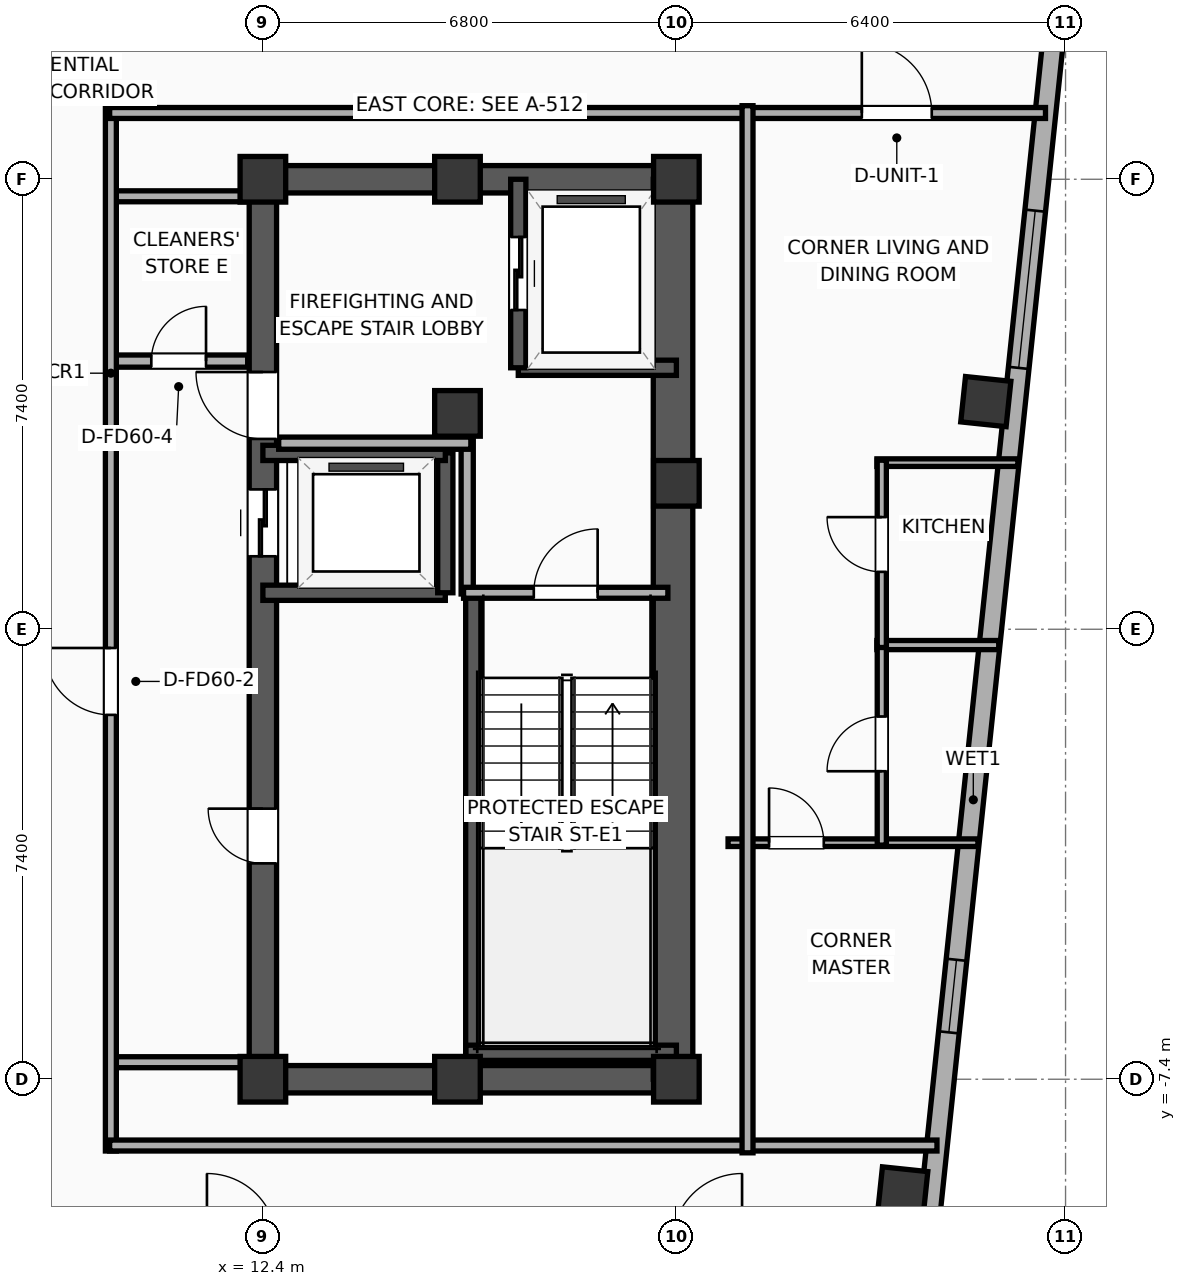
"""IFC4 building model, lengths in metres.
Left out: names, types, materials, properties, quantities, classifications, styles, units other than length and angle.
Written with IfcOpenShell. Run it as: python <this file> out.ifc"""

import sys

from ifc_helpers import new_model, si_unit, direction, frame, frame_2d, origin, origin_2d, place, context, subcontext, project, spatial, rectangle, hollow_rectangle, extrude, element, fill, save


model = new_model("IFC4")
c1 = context("Model", 3, precision=1e-05, world=origin(), true_north=direction((0.0, 1.0)))
c2 = subcontext(c1, "Body", "Model", "MODEL_VIEW")
j1 = project(units=[si_unit("LENGTHUNIT", "METRE"), si_unit("PLANEANGLEUNIT", "RADIAN")], contexts=[c1])
p1 = place(None, origin())
s1 = spatial("IfcSite", under=j1, at=p1, CompositionType="ELEMENT")
p2 = place(p1, origin())
s2 = spatial("IfcBuilding", under=s1, at=p2, CompositionType="ELEMENT")
p3 = place(p2, frame((0.0, 0.0, 299.0)))
s3 = spatial("IfcBuildingStorey", under=s2, at=p3, CompositionType="ELEMENT", Elevation=299.0)
for number, where, z_axis, x_axis in (
    (1, (12.4, -7.4, 0.0), (0.0, 0.0, 1.0), (1.0, 0.0, 0.0)),
    (2, (15.6, 3.55, 0.0), (0.0, 0.0, 1.0), (1.0, 0.0, 0.0)),
    (3, (12.4, 7.4, 0.0), (0.0, 0.0, 1.0), (1.0, 0.0, 0.0)),
    (4, (15.6, -7.4, 0.0), (0.0, 0.0, 1.0), (1.0, 0.0, 0.0)),
    (5, (15.6, 7.4, 0.0), (0.0, 0.0, 1.0), (1.0, 0.0, 0.0)),
    (6, (19.2, -7.4, 0.0), (0.0, 0.0, 1.0), (1.0, 0.0, 0.0)),
    (7, (19.2, 2.4, 0.0), (0.0, 0.0, 1.0), (1.0, 0.0, 0.0)),
    (8, (19.2, 7.4, 0.0), (0.0, 0.0, 1.0), (1.0, 0.0, 0.0)),
):
    element("IfcColumn", number, at=place(p3, frame(where, z_axis=z_axis, x_axis=x_axis)), inside=s3, PredefinedType="COLUMN", context=c2, shape_type="SweptSolid", body=[
        extrude(rectangle(XDim=0.75, YDim=0.75, at=origin_2d()), origin(), (0.0, 0.0, 1.0), 3.9),
    ])
for number, where, z_axis, x_axis in (
    (9, (12.175, -7.4, 0.0), (0.0, 0.0, 1.0), (1.0, 0.0, 0.0)),
    (10, (12.175, 7.4, 0.0), (0.0, 0.0, 1.0), (1.0, 0.0, 0.0)),
):
    element("IfcWall", number, at=place(p3, frame(where, z_axis=z_axis, x_axis=x_axis)), inside=s3, PredefinedType="SHEAR", context=c2, shape_type="SweptSolid", body=[
        extrude(rectangle(XDim=7.25, YDim=0.45, at=frame_2d((3.625, 0.0))), origin(), (0.0, 0.0, 1.0), 3.635),
    ])
p4 = place(p3, frame((12.4, -7.4, 0.0), z_axis=(0.0, 0.0, 1.0), x_axis=(0.0, 1.0, 0.0)))
e11 = element("IfcWall", 11, at=p4, inside=s3, PredefinedType="SHEAR", context=c2, shape_type="SweptSolid", body=[
    extrude(rectangle(XDim=14.8, YDim=0.45, at=frame_2d((7.4, 0.0))), origin(), (0.0, 0.0, 1.0), 3.635),
])
p5 = place(p4, frame((8.6, 0.0, 0.0)))
e12 = element("IfcOpeningElement", 12, at=p5, cuts=e11, PredefinedType="OPENING", context=c2, shape_type="SweptSolid", body=[
    extrude(rectangle(XDim=1.1, YDim=2.05, at=frame_2d((0.55, 1.025))), frame((0.0, 0.235, 0.0), z_axis=(0.0, -1.0, 0.0), x_axis=(1.0, 0.0, 0.0)), (0.0, 0.0, 1.0), 0.47),
])
p6 = place(p4, frame((10.53, 0.0, 0.0)))
e13 = element("IfcOpeningElement", 13, at=p6, cuts=e11, PredefinedType="OPENING", context=c2, shape_type="SweptSolid", body=[
    extrude(rectangle(XDim=1.1, YDim=2.05, at=frame_2d((0.55, 1.025))), frame((0.0, 0.235, 0.0), z_axis=(0.0, -1.0, 0.0), x_axis=(1.0, 0.0, 0.0)), (0.0, 0.0, 1.0), 0.47),
])
p7 = place(p4, frame((3.55, 0.0, 0.0)))
e14 = element("IfcOpeningElement", 14, at=p7, cuts=e11, PredefinedType="OPENING", context=c2, shape_type="SweptSolid", body=[
    extrude(rectangle(XDim=0.9, YDim=2.05, at=frame_2d((0.45, 1.025))), frame((0.0, 0.235, 0.0), z_axis=(0.0, -1.0, 0.0), x_axis=(1.0, 0.0, 0.0)), (0.0, 0.0, 1.0), 0.47),
])
p8 = place(p3, frame((19.145, -7.4, 0.0), z_axis=(0.0, 0.0, 1.0), x_axis=(0.0, 1.0, 0.0)))
e15 = element("IfcWall", 15, at=p8, inside=s3, PredefinedType="SHEAR", context=c2, shape_type="SweptSolid", body=[
    extrude(rectangle(XDim=14.8, YDim=0.65, at=frame_2d((7.4, 0.0))), origin(), (0.0, 0.0, 1.0), 3.635),
])
p9 = place(p3, frame((15.86, -7.085, 0.0), z_axis=(0.0, 0.0, 1.0), x_axis=(0.0, 1.0, 0.0)))
e16 = element("IfcWall", 16, at=p9, inside=s3, PredefinedType="SOLIDWALL", context=c2, shape_type="SweptSolid", body=[
    extrude(rectangle(XDim=7.685, YDim=0.25, at=frame_2d((3.843, 0.0))), origin(), (0.0, 0.0, 1.0), 3.635),
])
p10 = place(p3, frame((15.74, -6.965, 0.0), z_axis=(0.0, 0.0, 1.0), x_axis=(1.0, 0.0, 0.0)))
e17 = element("IfcWall", 17, at=p10, inside=s3, PredefinedType="SOLIDWALL", context=c2, shape_type="SweptSolid", body=[
    extrude(rectangle(XDim=3.46, YDim=0.25, at=frame_2d((1.73, 0.0))), origin(), (0.0, 0.0, 1.0), 3.635),
])
for number, where, z_axis, x_axis in (
    (18, (22.923, -9.252, 0.0), (0.0, 0.0, 1.0), (0.995, -0.105, 0.0)),
    (19, (24.289, 3.744, 0.0), (0.0, 0.0, 1.0), (0.995, -0.105, 0.0)),
):
    element("IfcColumn", number, at=place(p3, frame(where, z_axis=z_axis, x_axis=x_axis)), inside=s3, PredefinedType="COLUMN", context=c2, shape_type="SweptSolid", body=[
        extrude(hollow_rectangle(XDim=0.75, YDim=0.75, WallThickness=0.025, at=origin_2d()), origin(), (0.0, 0.0, 1.0), 3.9),
    ])
p11 = place(p3, frame((25.67, 12.296, 0.0), z_axis=(0.0, 0.0, 1.0), x_axis=(-0.104533282919, -0.994521388791, 0.0)))
e20 = element("IfcWall", 20, at=p11, inside=s3, PredefinedType="ELEMENTEDWALL", context=c2, shape_type="SweptSolid", body=[
    extrude(rectangle(XDim=30.366, YDim=0.34, at=frame_2d((15.183, 0.0))), origin(), (0.0, 0.0, 1.0), 3.635),
])
p12 = place(p11, frame((5.442, 0.0, 0.65)))
e21 = element("IfcOpeningElement", 21, at=p12, cuts=e20, PredefinedType="OPENING", context=c2, shape_type="SweptSolid", body=[
    extrude(rectangle(XDim=2.6, YDim=2.45, at=frame_2d((1.3, 1.225))), frame((0.0, 0.18, 0.0), z_axis=(0.0, -1.0, 0.0), x_axis=(1.0, 0.0, 0.0)), (0.0, 0.0, 1.0), 0.36),
])
p13 = place(p11, frame((27.017, 0.0, 0.75)))
e22 = element("IfcOpeningElement", 22, at=p13, cuts=e20, PredefinedType="OPENING", context=c2, shape_type="SweptSolid", body=[
    extrude(rectangle(XDim=1.2, YDim=2.05, at=frame_2d((0.6, 1.025))), frame((0.0, 0.18, 0.0), z_axis=(0.0, -1.0, 0.0), x_axis=(1.0, 0.0, 0.0)), (0.0, 0.0, 1.0), 0.36),
])
p14 = place(p11, frame((17.829, 0.0, 0.75)))
e23 = element("IfcOpeningElement", 23, at=p14, cuts=e20, PredefinedType="OPENING", context=c2, shape_type="SweptSolid", body=[
    extrude(rectangle(XDim=1.2, YDim=2.05, at=frame_2d((0.6, 1.025))), frame((0.0, 0.18, 0.0), z_axis=(0.0, -1.0, 0.0), x_axis=(1.0, 0.0, 0.0)), (0.0, 0.0, 1.0), 0.36),
])
p15 = place(p3, frame((16.6, 4.3, 0.0), z_axis=(0.0, 0.0, 1.0), x_axis=(1.0, 0.0, 0.0)))
e24 = element("IfcWall", 24, at=p15, inside=s3, PredefinedType="SOLIDWALL", context=c2, shape_type="SweptSolid", body=[
    extrude(rectangle(XDim=2.6, YDim=0.25, at=frame_2d((1.3, 0.0))), origin(), (0.0, 0.0, 1.0), 3.635),
])
p16 = place(p3, frame((16.6, 7.4, 0.0), z_axis=(0.0, 0.0, 1.0), x_axis=(0.0, -1.0, 0.0)))
e25 = element("IfcWall", 25, at=p16, inside=s3, PredefinedType="SOLIDWALL", context=c2, shape_type="SweptSolid", body=[
    extrude(rectangle(XDim=3.1, YDim=0.25, at=frame_2d((1.55, 0.0))), origin(), (0.0, 0.0, 1.0), 3.635),
])
p17 = place(p16, frame((0.95, 0.0, 0.0)))
e26 = element("IfcOpeningElement", 26, at=p17, cuts=e25, PredefinedType="OPENING", context=c2, shape_type="SweptSolid", body=[
    extrude(rectangle(XDim=1.2, YDim=2.05, at=frame_2d((0.6, 1.025))), frame((0.0, 0.135, 0.0), z_axis=(0.0, -1.0, 0.0), x_axis=(1.0, 0.0, 0.0)), (0.0, 0.0, 1.0), 0.27),
])
p18 = place(p3, frame((12.4, 0.6, 0.0), z_axis=(0.0, 0.0, 1.0), x_axis=(1.0, 0.0, 0.0)))
e27 = element("IfcWall", 27, at=p18, inside=s3, PredefinedType="SOLIDWALL", context=c2, shape_type="SweptSolid", body=[
    extrude(rectangle(XDim=3.0, YDim=0.25, at=frame_2d((1.5, 0.0))), origin(), (0.0, 0.0, 1.0), 3.635),
])
p19 = place(p3, frame((15.4, 0.6, 0.0), z_axis=(0.0, 0.0, 1.0), x_axis=(0.0, 1.0, 0.0)))
e28 = element("IfcWall", 28, at=p19, inside=s3, PredefinedType="SOLIDWALL", context=c2, shape_type="SweptSolid", body=[
    extrude(rectangle(XDim=2.3, YDim=0.25, at=frame_2d((1.15, 0.0))), origin(), (0.0, 0.0, 1.0), 3.635),
])
p20 = place(p3, frame((15.4, 2.9, 0.0), z_axis=(0.0, 0.0, 1.0), x_axis=(-1.0, 0.0, 0.0)))
e29 = element("IfcWall", 29, at=p20, inside=s3, PredefinedType="SOLIDWALL", context=c2, shape_type="SweptSolid", body=[
    extrude(rectangle(XDim=3.0, YDim=0.25, at=frame_2d((1.5, 0.0))), origin(), (0.0, 0.0, 1.0), 3.635),
])
p21 = place(p3, frame((15.76, 0.58, 0.0), z_axis=(0.0, 0.0, 1.0), x_axis=(0.0, 1.0, 0.0)))
e30 = element("IfcWall", 30, at=p21, inside=s3, PredefinedType="PARTITIONING", context=c2, shape_type="SweptSolid", body=[
    extrude(rectangle(XDim=2.52, YDim=0.2, at=frame_2d((1.26, 0.0))), origin(), (0.0, 0.0, 1.0), 3.635),
])
p22 = place(p3, frame((12.66, 3.06, 0.0), z_axis=(0.0, 0.0, 1.0), x_axis=(1.0, 0.0, 0.0)))
e31 = element("IfcWall", 31, at=p22, inside=s3, PredefinedType="PARTITIONING", context=c2, shape_type="SweptSolid", body=[
    extrude(rectangle(XDim=3.16, YDim=0.2, at=frame_2d((1.58, 0.0))), origin(), (0.0, 0.0, 1.0), 3.635),
])
p23 = place(p3, frame((15.7, 0.6, 0.0), z_axis=(0.0, 0.0, 1.0), x_axis=(1.0, 0.0, 0.0)))
e32 = element("IfcWall", 32, at=p23, inside=s3, PredefinedType="PARTITIONING", context=c2, shape_type="SweptSolid", body=[
    extrude(rectangle(XDim=3.36, YDim=0.18, at=frame_2d((1.68, 0.0))), origin(), (0.0, 0.0, 1.0), 3.635),
])
p24 = place(p23, frame((1.155, 0.0, 0.0)))
e33 = element("IfcOpeningElement", 33, at=p24, cuts=e32, PredefinedType="OPENING", context=c2, shape_type="SweptSolid", body=[
    extrude(rectangle(XDim=1.05, YDim=2.05, at=frame_2d((0.525, 1.025))), frame((0.0, 0.1, 0.0), z_axis=(0.0, -1.0, 0.0), x_axis=(1.0, 0.0, 0.0)), (0.0, 0.0, 1.0), 0.2),
])
p25 = place(p3, frame((9.88, 4.41, 0.0), z_axis=(0.0, 0.0, 1.0), x_axis=(1.0, 0.0, 0.0)))
e34 = element("IfcWall", 34, at=p25, inside=s3, PredefinedType="PARTITIONING", context=c2, shape_type="SweptSolid", body=[
    extrude(rectangle(XDim=2.27, YDim=0.2, at=frame_2d((1.135, 0.0))), origin(), (0.0, 0.0, 1.0), 3.635),
])
p26 = place(p25, frame((0.685, 0.0, 0.0)))
e35 = element("IfcOpeningElement", 35, at=p26, cuts=e34, PredefinedType="OPENING", context=c2, shape_type="SweptSolid", body=[
    extrude(rectangle(XDim=0.9, YDim=2.05, at=frame_2d((0.45, 1.025))), frame((0.0, 0.11, 0.0), z_axis=(0.0, -1.0, 0.0), x_axis=(1.0, 0.0, 0.0)), (0.0, 0.0, 1.0), 0.22),
])
for number, where, z_axis, x_axis in (
    (36, (9.88, 7.12, 0.0), (0.0, 0.0, 1.0), (1.0, 0.0, 0.0)),
    (37, (9.88, -7.12, 0.0), (0.0, 0.0, 1.0), (1.0, 0.0, 0.0)),
):
    element("IfcWall", number, at=place(p3, frame(where, z_axis=z_axis, x_axis=x_axis)), inside=s3, PredefinedType="PARTITIONING", context=c2, shape_type="SweptSolid", body=[
        extrude(rectangle(XDim=2.27, YDim=0.18, at=frame_2d((1.135, 0.0))), origin(), (0.0, 0.0, 1.0), 3.635),
    ])
p27 = place(p3, frame((9.9, -8.58, 0.0), z_axis=(0.0, 0.0, 1.0), x_axis=(0.0, 1.0, 0.0)))
e38 = element("IfcWall", 38, at=p27, inside=s3, PredefinedType="PARTITIONING", context=c2, shape_type="SweptSolid", body=[
    extrude(rectangle(XDim=17.16, YDim=0.18, at=frame_2d((8.58, 0.0))), origin(), (0.0, 0.0, 1.0), 3.635),
])
p28 = place(p27, frame((7.172, 0.0, 0.0)))
e39 = element("IfcOpeningElement", 39, at=p28, cuts=e38, PredefinedType="OPENING", context=c2, shape_type="SweptSolid", body=[
    extrude(rectangle(XDim=1.1, YDim=2.05, at=frame_2d((0.55, 1.025))), frame((0.0, 0.1, 0.0), z_axis=(0.0, -1.0, 0.0), x_axis=(1.0, 0.0, 0.0)), (0.0, 0.0, 1.0), 0.2),
])
p29 = place(p3, frame((9.88, 8.49, 0.0), z_axis=(0.0, 0.0, 1.0), x_axis=(1.0, 0.0, 0.0)))
e40 = element("IfcWall", 40, at=p29, inside=s3, PredefinedType="PARTITIONING", context=c2, shape_type="SweptSolid", body=[
    extrude(rectangle(XDim=15.39, YDim=0.18, at=frame_2d((7.695, 0.0))), origin(), (0.0, 0.0, 1.0), 3.635),
])
p30 = place(p29, frame((12.37, 0.0, 0.0)))
e41 = element("IfcOpeningElement", 41, at=p30, cuts=e40, PredefinedType="OPENING", context=c2, shape_type="SweptSolid", body=[
    extrude(rectangle(XDim=1.15, YDim=2.05, at=frame_2d((0.575, 1.025))), frame((0.0, 0.1, 0.0), z_axis=(0.0, -1.0, 0.0), x_axis=(1.0, 0.0, 0.0)), (0.0, 0.0, 1.0), 0.2),
])
p31 = place(p3, frame((9.88, -8.49, 0.0), z_axis=(0.0, 0.0, 1.0), x_axis=(1.0, 0.0, 0.0)))
e42 = element("IfcWall", 42, at=p31, inside=s3, PredefinedType="PARTITIONING", context=c2, shape_type="SweptSolid", body=[
    extrude(rectangle(XDim=13.606, YDim=0.18, at=frame_2d((6.803, 0.0))), origin(), (0.0, 0.0, 1.0), 3.635),
])
p32 = place(p3, frame((22.498, 2.74, 0.0), z_axis=(0.0, 0.0, 1.0), x_axis=(1.0, 0.0, 0.0)))
e43 = element("IfcWall", 43, at=p32, inside=s3, PredefinedType="PARTITIONING", context=c2, shape_type="SweptSolid", body=[
    extrude(rectangle(XDim=2.319, YDim=0.125, at=frame_2d((1.159, 0.0))), origin(), (0.0, 0.0, 1.0), 3.635),
])
p33 = place(p3, frame((22.498, -0.26, 0.0), z_axis=(0.0, 0.0, 1.0), x_axis=(1.0, 0.0, 0.0)))
e44 = element("IfcWall", 44, at=p33, inside=s3, PredefinedType="PLUMBINGWALL", context=c2, shape_type="SweptSolid", body=[
    extrude(rectangle(XDim=2.003, YDim=0.15, at=frame_2d((1.001, 0.0))), origin(), (0.0, 0.0, 1.0), 3.635),
])
p34 = place(p3, frame((20.05, -3.51, 0.0), z_axis=(0.0, 0.0, 1.0), x_axis=(1.0, 0.0, 0.0)))
e45 = element("IfcWall", 45, at=p34, inside=s3, PredefinedType="PARTITIONING", context=c2, shape_type="SweptSolid", body=[
    extrude(rectangle(XDim=4.11, YDim=0.125, at=frame_2d((2.055, 0.0))), origin(), (0.0, 0.0, 1.0), 3.635),
])
p35 = place(p34, frame((0.674, 0.0, 0.0)))
e46 = element("IfcOpeningElement", 46, at=p35, cuts=e45, PredefinedType="OPENING", context=c2, shape_type="SweptSolid", body=[
    extrude(rectangle(XDim=0.9, YDim=2.05, at=frame_2d((0.45, 1.025))), frame((0.0, 0.073, 0.0), z_axis=(0.0, -1.0, 0.0), x_axis=(1.0, 0.0, 0.0)), (0.0, 0.0, 1.0), 0.145),
])
p36 = place(p3, frame((22.578, -3.55, 0.0), z_axis=(0.0, 0.0, 1.0), x_axis=(0.0, 1.0, 0.0)))
e47 = element("IfcWall", 47, at=p36, inside=s3, PredefinedType="PLUMBINGWALL", context=c2, shape_type="SweptSolid", body=[
    extrude(rectangle(XDim=3.33, YDim=0.15, at=frame_2d((1.665, 0.0))), origin(), (0.0, 0.0, 1.0), 3.635),
])
p37 = place(p36, frame((1.215, 0.0, 0.0)))
e48 = element("IfcOpeningElement", 48, at=p37, cuts=e47, PredefinedType="OPENING", context=c2, shape_type="SweptSolid", body=[
    extrude(rectangle(XDim=0.9, YDim=2.05, at=frame_2d((0.45, 1.025))), frame((0.0, 0.085, 0.0), z_axis=(0.0, -1.0, 0.0), x_axis=(1.0, 0.0, 0.0)), (0.0, 0.0, 1.0), 0.17),
])
p38 = place(p3, frame((22.578, -0.3, 0.0), z_axis=(0.0, 0.0, 1.0), x_axis=(0.0, 1.0, 0.0)))
e49 = element("IfcWall", 49, at=p38, inside=s3, PredefinedType="PLUMBINGWALL", context=c2, shape_type="SweptSolid", body=[
    extrude(rectangle(XDim=3.08, YDim=0.15, at=frame_2d((1.54, 0.0))), origin(), (0.0, 0.0, 1.0), 3.635),
])
p39 = place(p38, frame((1.244, 0.0, 0.0)))
e50 = element("IfcOpeningElement", 50, at=p39, cuts=e49, PredefinedType="OPENING", context=c2, shape_type="SweptSolid", body=[
    extrude(rectangle(XDim=0.9, YDim=2.05, at=frame_2d((0.45, 1.025))), frame((0.0, 0.085, 0.0), z_axis=(0.0, -1.0, 0.0), x_axis=(1.0, 0.0, 0.0)), (0.0, 0.0, 1.0), 0.17),
])
p40 = place(p3, frame((20.37, -8.61, 0.0), z_axis=(0.0, 0.0, 1.0), x_axis=(0.0, 1.0, 0.0)))
e51 = element("IfcWall", 51, at=p40, inside=s3, PredefinedType="PARTITIONING", context=c2, shape_type="SweptSolid", body=[
    extrude(rectangle(XDim=17.22, YDim=0.18, at=frame_2d((8.61, 0.0))), origin(), (0.0, 0.0, 1.0), 3.635),
])
p41 = place(p12, origin())
e52 = element("IfcWindow", 52, at=p41, inside=s3, PartitioningType="SINGLE_PANEL", PredefinedType="WINDOW", context=c2, shape_type="SweptSolid", body=[
    extrude(rectangle(XDim=2.6, YDim=2.45, at=frame_2d((1.3, 1.225))), frame((0.0, 0.03, 0.0), z_axis=(0.0, -1.0, 0.0), x_axis=(1.0, 0.0, 0.0)), (0.0, 0.0, 1.0), 0.06),
])
fill(e21, e52)
p42 = place(p14, origin())
e53 = element("IfcWindow", 53, at=p42, inside=s3, PartitioningType="SINGLE_PANEL", PredefinedType="WINDOW", context=c2, shape_type="SweptSolid", body=[
    extrude(rectangle(XDim=1.2, YDim=2.05, at=frame_2d((0.6, 1.025))), frame((0.0, 0.03, 0.0), z_axis=(0.0, -1.0, 0.0), x_axis=(1.0, 0.0, 0.0)), (0.0, 0.0, 1.0), 0.06),
])
fill(e23, e53)
p43 = place(p17, origin())
e54 = element("IfcDoor", 54, at=p43, inside=s3, OperationType="SLIDING_TO_LEFT", PredefinedType="DOOR", context=c2, shape_type="SweptSolid", body=[
    extrude(rectangle(XDim=1.2, YDim=2.05, at=frame_2d((0.6, 1.025))), frame((0.0, 0.025, 0.0), z_axis=(0.0, -1.0, 0.0), x_axis=(1.0, 0.0, 0.0)), (0.0, 0.0, 1.0), 0.05),
])
fill(e26, e54)
p44 = place(p5, origin())
e55 = element("IfcDoor", 55, at=p44, inside=s3, OperationType="SLIDING_TO_LEFT", PredefinedType="DOOR", context=c2, shape_type="SweptSolid", body=[
    extrude(rectangle(XDim=1.1, YDim=2.05, at=frame_2d((0.55, 1.025))), frame((0.0, 0.025, 0.0), z_axis=(0.0, -1.0, 0.0), x_axis=(1.0, 0.0, 0.0)), (0.0, 0.0, 1.0), 0.05),
])
fill(e12, e55)
p45 = place(p24, origin())
e56 = element("IfcDoor", 56, at=p45, inside=s3, OperationType="SINGLE_SWING_RIGHT", PredefinedType="DOOR", context=c2, shape_type="SweptSolid", body=[
    extrude(rectangle(XDim=1.05, YDim=2.05, at=frame_2d((0.525, 1.025))), frame((0.0, 0.025, 0.0), z_axis=(0.0, -1.0, 0.0), x_axis=(1.0, 0.0, 0.0)), (0.0, 0.0, 1.0), 0.05),
])
fill(e33, e56)
p46 = place(p26, origin())
e57 = element("IfcDoor", 57, at=p46, inside=s3, OperationType="SINGLE_SWING_RIGHT", PredefinedType="DOOR", context=c2, shape_type="SweptSolid", body=[
    extrude(rectangle(XDim=0.9, YDim=2.05, at=frame_2d((0.45, 1.025))), frame((0.0, 0.025, 0.0), z_axis=(0.0, -1.0, 0.0), x_axis=(1.0, 0.0, 0.0)), (0.0, 0.0, 1.0), 0.05),
])
fill(e35, e57)
p47 = place(p28, origin())
e58 = element("IfcDoor", 58, at=p47, inside=s3, OperationType="SINGLE_SWING_RIGHT", PredefinedType="DOOR", context=c2, shape_type="SweptSolid", body=[
    extrude(rectangle(XDim=1.1, YDim=2.05, at=frame_2d((0.55, 1.025))), frame((0.0, 0.025, 0.0), z_axis=(0.0, -1.0, 0.0), x_axis=(1.0, 0.0, 0.0)), (0.0, 0.0, 1.0), 0.05),
])
fill(e39, e58)
p48 = place(p30, origin())
e59 = element("IfcDoor", 59, at=p48, inside=s3, OperationType="SINGLE_SWING_LEFT", PredefinedType="DOOR", context=c2, shape_type="SweptSolid", body=[
    extrude(rectangle(XDim=1.15, YDim=2.05, at=frame_2d((0.575, 1.025))), frame((0.0, 0.025, 0.0), z_axis=(0.0, -1.0, 0.0), x_axis=(1.0, 0.0, 0.0)), (0.0, 0.0, 1.0), 0.05),
])
fill(e41, e59)
p49 = place(p35, origin())
e60 = element("IfcDoor", 60, at=p49, inside=s3, OperationType="SINGLE_SWING_LEFT", PredefinedType="DOOR", context=c2, shape_type="SweptSolid", body=[
    extrude(rectangle(XDim=0.9, YDim=2.05, at=frame_2d((0.45, 1.025))), frame((0.0, 0.025, 0.0), z_axis=(0.0, -1.0, 0.0), x_axis=(1.0, 0.0, 0.0)), (0.0, 0.0, 1.0), 0.05),
])
fill(e46, e60)
p50 = place(p37, origin())
e61 = element("IfcDoor", 61, at=p50, inside=s3, OperationType="SINGLE_SWING_LEFT", PredefinedType="DOOR", context=c2, shape_type="SweptSolid", body=[
    extrude(rectangle(XDim=0.9, YDim=2.05, at=frame_2d((0.45, 1.025))), frame((0.0, 0.025, 0.0), z_axis=(0.0, -1.0, 0.0), x_axis=(1.0, 0.0, 0.0)), (0.0, 0.0, 1.0), 0.05),
])
fill(e48, e61)
p51 = place(p39, origin())
e62 = element("IfcDoor", 62, at=p51, inside=s3, OperationType="SINGLE_SWING_RIGHT", PredefinedType="DOOR", context=c2, shape_type="SweptSolid", body=[
    extrude(rectangle(XDim=0.9, YDim=2.05, at=frame_2d((0.45, 1.025))), frame((0.0, 0.025, 0.0), z_axis=(0.0, -1.0, 0.0), x_axis=(1.0, 0.0, 0.0)), (0.0, 0.0, 1.0), 0.05),
])
fill(e50, e62)
p52 = place(p6, origin())
e63 = element("IfcDoor", 63, at=p52, inside=s3, OperationType="SINGLE_SWING_RIGHT", PredefinedType="DOOR", context=c2, shape_type="SweptSolid", body=[
    extrude(rectangle(XDim=1.1, YDim=2.05, at=frame_2d((0.55, 1.025))), frame((0.0, 0.025, 0.0), z_axis=(0.0, -1.0, 0.0), x_axis=(1.0, 0.0, 0.0)), (0.0, 0.0, 1.0), 0.05),
])
fill(e13, e63)
p53 = place(p7, origin())
e64 = element("IfcDoor", 64, at=p53, inside=s3, OperationType="SINGLE_SWING_RIGHT", PredefinedType="DOOR", context=c2, shape_type="SweptSolid", body=[
    extrude(rectangle(XDim=0.9, YDim=2.05, at=frame_2d((0.45, 1.025))), frame((0.0, 0.025, 0.0), z_axis=(0.0, -1.0, 0.0), x_axis=(1.0, 0.0, 0.0)), (0.0, 0.0, 1.0), 0.05),
])
fill(e14, e64)
save(model, sys.argv[1])
